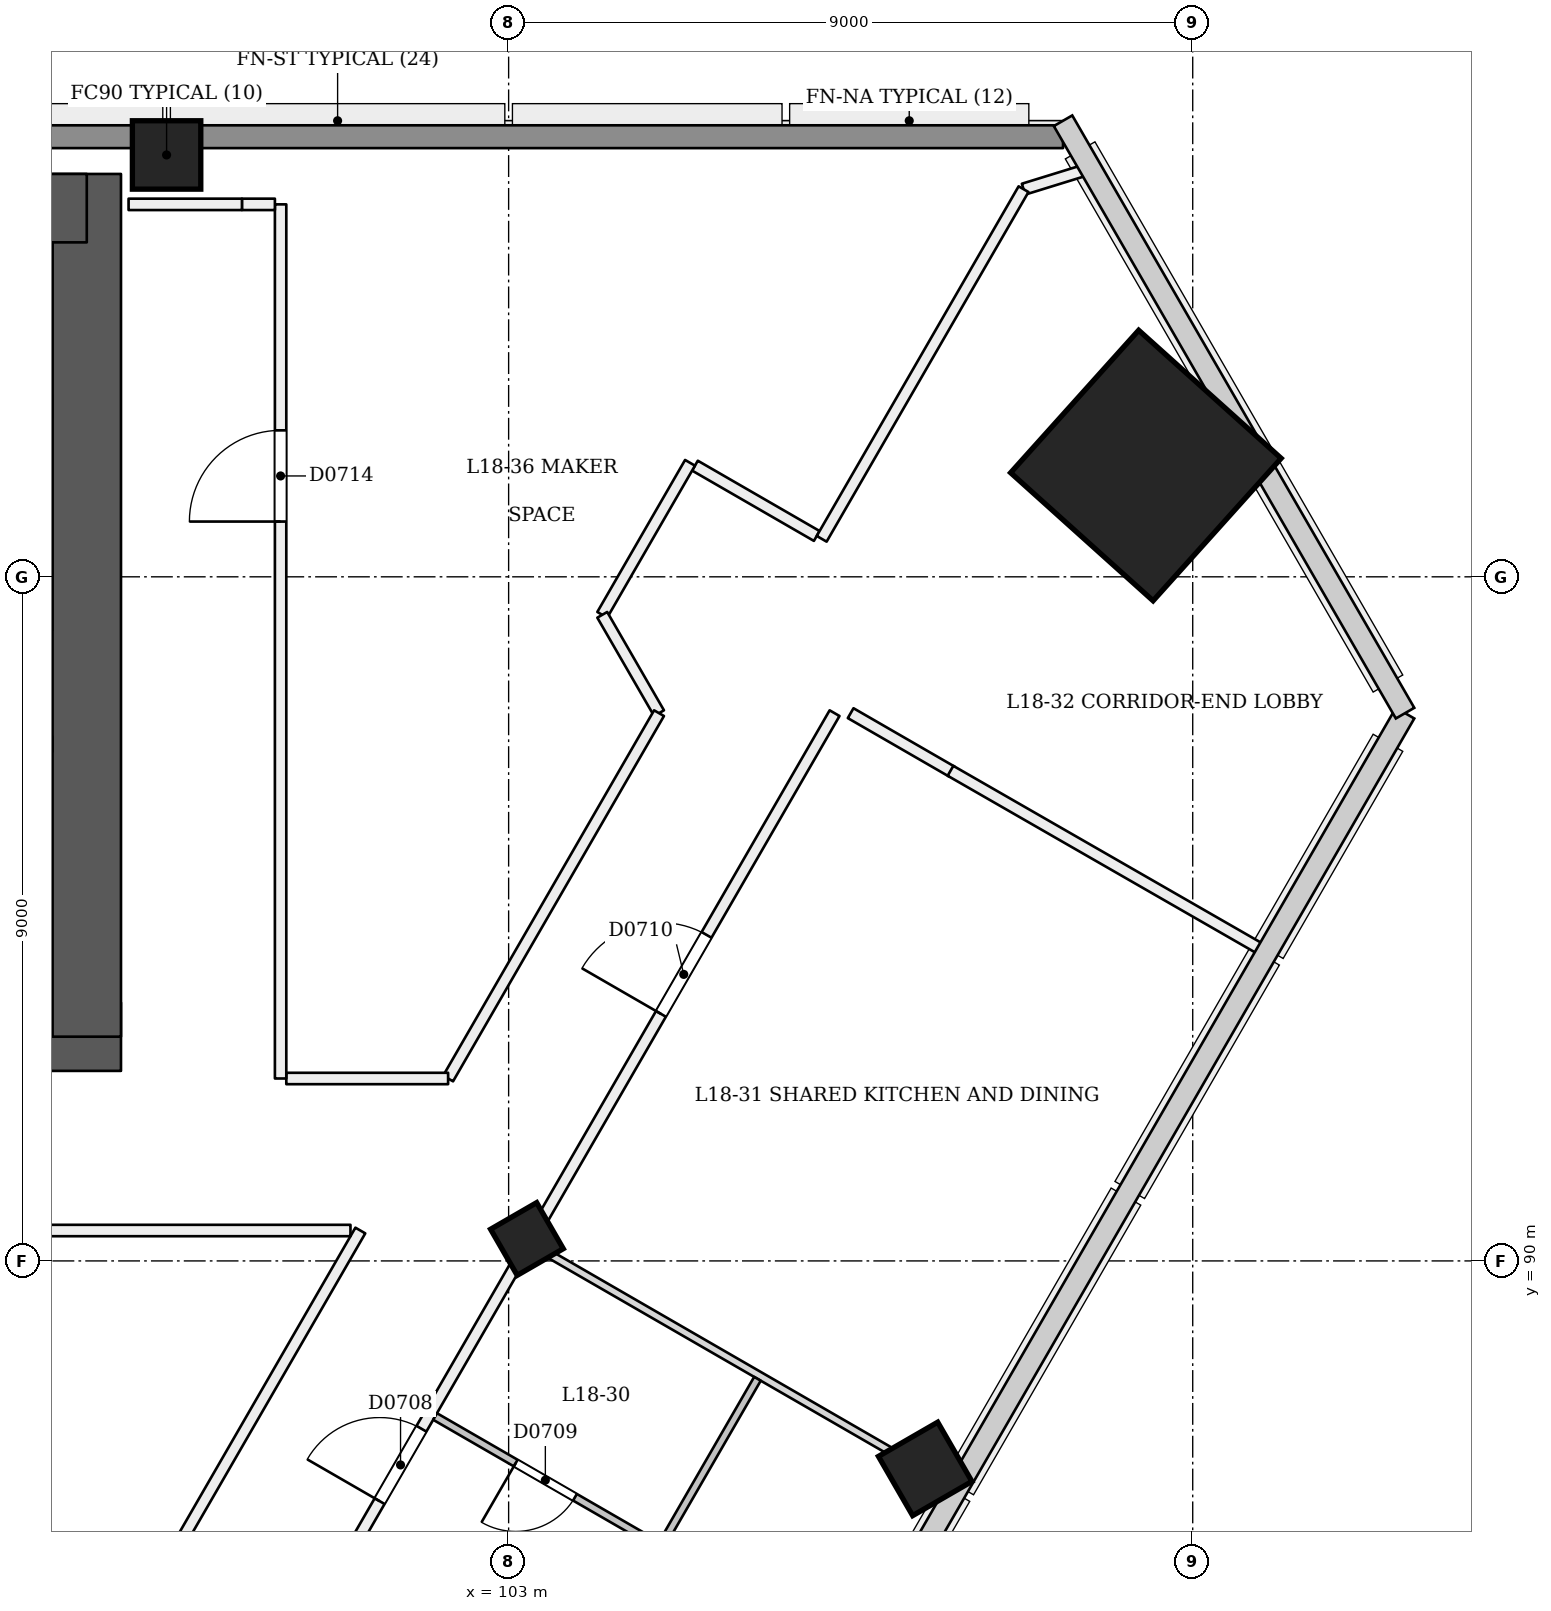
"""IFC4 building model, lengths in metres.
Left out: names, types, materials, properties, quantities, classifications, styles, units other than length and angle.
Written with IfcOpenShell. Run it as: python <this file> out.ifc"""

import sys

from ifc_helpers import new_model, si_unit, direction, frame, frame_2d, origin, origin_2d, place, context, subcontext, project, spatial, rectangle, extrude, element, fill, save


model = new_model("IFC4")
c1 = context("Model", 3, precision=1e-05, world=origin(), true_north=direction((0.0, 1.0)))
c2 = subcontext(c1, "Body", "Model", "MODEL_VIEW")
j1 = project(units=[si_unit("LENGTHUNIT", "METRE"), si_unit("PLANEANGLEUNIT", "RADIAN")], contexts=[c1])
p1 = place(None, origin())
s1 = spatial("IfcSite", under=j1, at=p1, CompositionType="ELEMENT")
p2 = place(p1, origin())
s2 = spatial("IfcBuilding", under=s1, at=p2, CompositionType="ELEMENT")
p3 = place(p2, frame((0.0, 0.0, 73.8)))
s3 = spatial("IfcBuildingStorey", under=s2, at=p3, CompositionType="ELEMENT", Elevation=73.8)
p4 = place(p3, frame((72.55, 92.95, 0.0), z_axis=(0.0, 0.0, 1.0), x_axis=(1.0, 0.0, 0.0)))
e1 = element("IfcWall", 1, at=p4, inside=s3, PredefinedType="SHEAR", context=c2, shape_type="SweptSolid", body=[
    extrude(rectangle(XDim=25.35, YDim=0.9, at=frame_2d((12.675, 0.0))), origin(), (0.0, 0.0, 1.0), 3.6),
])
p5 = place(p4, frame((1.25, 0.0, 0.0)))
e2 = element("IfcOpeningElement", 2, at=p5, cuts=e1, PredefinedType="OPENING", context=c2, shape_type="SweptSolid", body=[
    extrude(rectangle(XDim=1.2, YDim=2.1, at=frame_2d((0.6, 1.05))), frame((0.0, 0.46, 0.0), z_axis=(0.0, -1.0, 0.0), x_axis=(1.0, 0.0, 0.0)), (0.0, 0.0, 1.0), 0.921),
])
p6 = place(p4, frame((3.45, 0.0, 0.0)))
e3 = element("IfcOpeningElement", 3, at=p6, cuts=e1, PredefinedType="OPENING", context=c2, shape_type="SweptSolid", body=[
    extrude(rectangle(XDim=1.2, YDim=2.1, at=frame_2d((0.6, 1.05))), frame((0.0, 0.46, 0.0), z_axis=(0.0, -1.0, 0.0), x_axis=(1.0, 0.0, 0.0)), (0.0, 0.0, 1.0), 0.921),
])
p7 = place(p4, frame((13.45, 0.0, 0.0)))
e4 = element("IfcOpeningElement", 4, at=p7, cuts=e1, PredefinedType="OPENING", context=c2, shape_type="SweptSolid", body=[
    extrude(rectangle(XDim=1.2, YDim=2.1, at=frame_2d((0.6, 1.05))), frame((0.0, 0.46, 0.0), z_axis=(0.0, -1.0, 0.0), x_axis=(1.0, 0.0, 0.0)), (0.0, 0.0, 1.0), 0.921),
])
p8 = place(p4, frame((15.913, 0.0, 0.0)))
e5 = element("IfcOpeningElement", 5, at=p8, cuts=e1, PredefinedType="OPENING", context=c2, shape_type="SweptSolid", body=[
    extrude(rectangle(XDim=1.0, YDim=2.1, at=frame_2d((0.5, 1.05))), frame((0.0, 0.46, 0.0), z_axis=(0.0, -1.0, 0.0), x_axis=(1.0, 0.0, 0.0)), (0.0, 0.0, 1.0), 0.921),
])
p9 = place(p4, frame((18.35, 0.0, 0.0)))
e6 = element("IfcOpeningElement", 6, at=p9, cuts=e1, PredefinedType="OPENING", context=c2, shape_type="SweptSolid", body=[
    extrude(rectangle(XDim=1.0, YDim=2.1, at=frame_2d((0.5, 1.05))), frame((0.0, 0.46, 0.0), z_axis=(0.0, -1.0, 0.0), x_axis=(1.0, 0.0, 0.0)), (0.0, 0.0, 1.0), 0.921),
])
p10 = place(p4, frame((20.7, 0.0, 0.0)))
e7 = element("IfcOpeningElement", 7, at=p10, cuts=e1, PredefinedType="OPENING", context=c2, shape_type="SweptSolid", body=[
    extrude(rectangle(XDim=1.0, YDim=2.1, at=frame_2d((0.5, 1.05))), frame((0.0, 0.46, 0.0), z_axis=(0.0, -1.0, 0.0), x_axis=(1.0, 0.0, 0.0)), (0.0, 0.0, 1.0), 0.921),
])
p11 = place(p4, frame((22.988, 0.0, 0.0)))
e8 = element("IfcOpeningElement", 8, at=p11, cuts=e1, PredefinedType="OPENING", context=c2, shape_type="SweptSolid", body=[
    extrude(rectangle(XDim=1.0, YDim=2.1, at=frame_2d((0.5, 1.05))), frame((0.0, 0.46, 0.0), z_axis=(0.0, -1.0, 0.0), x_axis=(1.0, 0.0, 0.0)), (0.0, 0.0, 1.0), 0.921),
])
p12 = place(p3, frame((97.45, 92.95, 0.0), z_axis=(0.0, 0.0, 1.0), x_axis=(0.0, 1.0, 0.0)))
e9 = element("IfcWall", 9, at=p12, inside=s3, PredefinedType="SHEAR", context=c2, shape_type="SweptSolid", body=[
    extrude(rectangle(XDim=11.35, YDim=0.9, at=frame_2d((5.675, 0.0))), origin(), (0.0, 0.0, 1.0), 3.6),
])
p13 = place(p3, frame((97.45, 103.85, 0.0), z_axis=(0.0, 0.0, 1.0), x_axis=(-1.0, 0.0, 0.0)))
e10 = element("IfcWall", 10, at=p13, inside=s3, PredefinedType="SHEAR", context=c2, shape_type="SweptSolid", body=[
    extrude(rectangle(XDim=25.35, YDim=0.9, at=frame_2d((12.675, 0.0))), origin(), (0.0, 0.0, 1.0), 3.6),
])
p14 = place(p3, frame((103.268, 90.242, -0.021), z_axis=(-0.022222910879, 0.038415824599, 0.999014697916), x_axis=(-0.499512959151, -0.866022170157, 0.022190187852)))
e11 = element("IfcColumn", 11, at=p14, inside=s3, PredefinedType="COLUMN", context=c2, shape_type="SweptSolid", body=[
    extrude(rectangle(XDim=0.7, YDim=0.7, at=origin_2d()), origin(), (0.0, 0.0, 1.0), 3.604),
])
p15 = place(p3, frame((111.418, 100.453, 0.0), z_axis=(-0.028403721265, 0.009287135593, 0.999553389135), x_axis=(0.498883816319, -0.866383823183, 0.022226307414)))
e12 = element("IfcColumn", 12, at=p15, inside=s3, PredefinedType="COLUMN", context=c2, shape_type="SweptSolid", body=[
    extrude(rectangle(XDim=2.52, YDim=2.52, at=origin_2d()), origin(), (0.0, 0.0, 1.0), 3.602),
])
p16 = place(p3, frame((98.5, 104.55, 0.0), z_axis=(0.0, 0.0, 1.0), x_axis=(1.0, 0.0, 0.0)))
e13 = element("IfcColumn", 13, at=p16, inside=s3, PredefinedType="COLUMN", context=c2, shape_type="SweptSolid", body=[
    extrude(rectangle(XDim=0.9, YDim=0.9, at=origin_2d()), origin(), (0.0, 0.0, 1.0), 3.6),
])
p17 = place(p3, frame((108.508, 87.216, -0.027), z_axis=(-0.02222134892, 0.038480872521, 0.999012229206), x_axis=(-0.500174577835, -0.86563950587, 0.022217955907)))
e14 = element("IfcColumn", 14, at=p17, inside=s3, PredefinedType="COLUMN", context=c2, shape_type="SweptSolid", body=[
    extrude(rectangle(XDim=0.9, YDim=0.9, at=origin_2d()), origin(), (0.0, 0.0, 1.0), 3.604),
])
p18 = place(p3, frame((85.747, 59.896, 0.0), z_axis=(0.0, 0.0, 1.0), x_axis=(0.500002549277, 0.866023931954, 0.0)))
e15 = element("IfcWall", 15, at=p18, inside=s3, PredefinedType="PARTITIONING", context=c2, shape_type="SweptSolid", body=[
    extrude(rectangle(XDim=43.082, YDim=0.15, at=frame_2d((21.541, 0.0))), origin(), (0.0, 0.0, 1.0), 2.7),
])
p19 = place(p18, frame((0.244, 0.0, 0.0)))
e16 = element("IfcOpeningElement", 16, at=p19, cuts=e15, PredefinedType="OPENING", context=c2, shape_type="SweptSolid", body=[
    extrude(rectangle(XDim=1.2, YDim=2.1, at=frame_2d((0.6, 1.05))), frame((0.0, 0.085, 0.0), z_axis=(0.0, -1.0, 0.0), x_axis=(1.0, 0.0, 0.0)), (0.0, 0.0, 1.0), 0.171),
])
p20 = place(p18, frame((4.146, 0.0, 0.0)))
e17 = element("IfcOpeningElement", 17, at=p20, cuts=e15, PredefinedType="OPENING", context=c2, shape_type="SweptSolid", body=[
    extrude(rectangle(XDim=1.0, YDim=2.1, at=frame_2d((0.5, 1.05))), frame((0.0, 0.085, 0.0), z_axis=(0.0, -1.0, 0.0), x_axis=(1.0, 0.0, 0.0)), (0.0, 0.0, 1.0), 0.171),
])
p21 = place(p18, frame((10.821, 0.0, 0.0)))
e18 = element("IfcOpeningElement", 18, at=p21, cuts=e15, PredefinedType="OPENING", context=c2, shape_type="SweptSolid", body=[
    extrude(rectangle(XDim=1.0, YDim=2.1, at=frame_2d((0.5, 1.05))), frame((0.0, 0.085, 0.0), z_axis=(0.0, -1.0, 0.0), x_axis=(1.0, 0.0, 0.0)), (0.0, 0.0, 1.0), 0.171),
])
p22 = place(p18, frame((13.262, 0.0, 0.0)))
e19 = element("IfcOpeningElement", 19, at=p22, cuts=e15, PredefinedType="OPENING", context=c2, shape_type="SweptSolid", body=[
    extrude(rectangle(XDim=1.0, YDim=2.1, at=frame_2d((0.5, 1.05))), frame((0.0, 0.085, 0.0), z_axis=(0.0, -1.0, 0.0), x_axis=(1.0, 0.0, 0.0)), (0.0, 0.0, 1.0), 0.171),
])
p23 = place(p18, frame((20.941, 0.0, 0.0)))
e20 = element("IfcOpeningElement", 20, at=p23, cuts=e15, PredefinedType="OPENING", context=c2, shape_type="SweptSolid", body=[
    extrude(rectangle(XDim=1.2, YDim=2.1, at=frame_2d((0.6, 1.05))), frame((0.0, 0.085, 0.0), z_axis=(0.0, -1.0, 0.0), x_axis=(1.0, 0.0, 0.0)), (0.0, 0.0, 1.0), 0.171),
])
p24 = place(p18, frame((28.821, 0.0, 0.0)))
e21 = element("IfcOpeningElement", 21, at=p24, cuts=e15, PredefinedType="OPENING", context=c2, shape_type="SweptSolid", body=[
    extrude(rectangle(XDim=1.0, YDim=2.1, at=frame_2d((0.5, 1.05))), frame((0.0, 0.085, 0.0), z_axis=(0.0, -1.0, 0.0), x_axis=(1.0, 0.0, 0.0)), (0.0, 0.0, 1.0), 0.171),
])
p25 = place(p18, frame((31.112, 0.0, 0.0)))
e22 = element("IfcOpeningElement", 22, at=p25, cuts=e15, PredefinedType="OPENING", context=c2, shape_type="SweptSolid", body=[
    extrude(rectangle(XDim=1.1, YDim=2.1, at=frame_2d((0.55, 1.05))), frame((0.0, 0.085, 0.0), z_axis=(0.0, -1.0, 0.0), x_axis=(1.0, 0.0, 0.0)), (0.0, 0.0, 1.0), 0.171),
])
p26 = place(p18, frame((38.514, 0.0, 0.0)))
e23 = element("IfcOpeningElement", 23, at=p26, cuts=e15, PredefinedType="OPENING", context=c2, shape_type="SweptSolid", body=[
    extrude(rectangle(XDim=1.2, YDim=2.1, at=frame_2d((0.6, 1.05))), frame((0.0, 0.085, 0.0), z_axis=(0.0, -1.0, 0.0), x_axis=(1.0, 0.0, 0.0)), (0.0, 0.0, 1.0), 0.171),
])
p27 = place(p3, frame((107.5, 97.206, 0.0), z_axis=(0.0, 0.0, 1.0), x_axis=(0.866034781647, -0.499983756713, 0.0)))
e24 = element("IfcWall", 24, at=p27, inside=s3, PredefinedType="PARTITIONING", context=c2, shape_type="SweptSolid", body=[
    extrude(rectangle(XDim=1.537, YDim=0.15, at=frame_2d((0.768, 0.0))), origin(), (0.0, 0.0, 1.0), 3.1),
])
p28 = place(p3, frame((101.049, 90.4, 0.0), z_axis=(0.0, 0.0, 1.0), x_axis=(-0.500000325473, -0.866025215872, 0.0)))
e25 = element("IfcWall", 25, at=p28, inside=s3, PredefinedType="PARTITIONING", context=c2, shape_type="SweptSolid", body=[
    extrude(rectangle(XDim=31.968, YDim=0.15, at=frame_2d((15.984, 0.0))), origin(), (0.0, 0.0, 1.0), 3.1),
])
p29 = place(p28, frame((16.691, 0.0, 0.0)))
e26 = element("IfcOpeningElement", 26, at=p29, cuts=e25, PredefinedType="OPENING", context=c2, shape_type="SweptSolid", body=[
    extrude(rectangle(XDim=1.2, YDim=2.1, at=frame_2d((0.6, 1.05))), frame((0.0, 0.085, 0.0), z_axis=(0.0, -1.0, 0.0), x_axis=(1.0, 0.0, 0.0)), (0.0, 0.0, 1.0), 0.171),
])
p30 = place(p28, frame((6.541, 0.0, 0.0)))
e27 = element("IfcOpeningElement", 27, at=p30, cuts=e25, PredefinedType="OPENING", context=c2, shape_type="SweptSolid", body=[
    extrude(rectangle(XDim=1.2, YDim=2.1, at=frame_2d((0.6, 1.05))), frame((0.0, 0.085, 0.0), z_axis=(0.0, -1.0, 0.0), x_axis=(1.0, 0.0, 0.0)), (0.0, 0.0, 1.0), 0.171),
])
p31 = place(p3, frame((88.0, 90.4, 0.0), z_axis=(0.0, 0.0, 1.0), x_axis=(1.0, 0.0, 0.0)))
e28 = element("IfcWall", 28, at=p31, inside=s3, PredefinedType="PARTITIONING", context=c2, shape_type="SweptSolid", body=[
    extrude(rectangle(XDim=12.919, YDim=0.15, at=frame_2d((6.459, 0.0))), origin(), (0.0, 0.0, 1.0), 3.1),
])
p32 = place(p3, frame((107.053, 99.538, 0.0), z_axis=(0.0, 0.0, 1.0), x_axis=(-0.866058118026, 0.49994333299, 0.0)))
e29 = element("IfcWall", 29, at=p32, inside=s3, PredefinedType="PARTITIONING", context=c2, shape_type="SweptSolid", body=[
    extrude(rectangle(XDim=1.85, YDim=0.15, at=frame_2d((0.925, 0.0))), origin(), (0.0, 0.0, 1.0), 3.1),
])
p33 = place(p3, frame((105.386, 100.5, 0.0), z_axis=(0.0, 0.0, 1.0), x_axis=(-0.500027479704, -0.866009537788, 0.0)))
e30 = element("IfcWall", 30, at=p33, inside=s3, PredefinedType="PARTITIONING", context=c2, shape_type="SweptSolid", body=[
    extrude(rectangle(XDim=2.309, YDim=0.15, at=frame_2d((1.155, 0.0))), origin(), (0.0, 0.0, 1.0), 3.1),
])
p34 = place(p3, frame((104.232, 98.5, 0.0), z_axis=(0.0, 0.0, 1.0), x_axis=(0.500076103225, -0.865981461108, 0.0)))
e31 = element("IfcWall", 31, at=p34, inside=s3, PredefinedType="PARTITIONING", context=c2, shape_type="SweptSolid", body=[
    extrude(rectangle(XDim=1.494, YDim=0.15, at=frame_2d((0.747, 0.0))), origin(), (0.0, 0.0, 1.0), 3.1),
])
p35 = place(p3, frame((104.979, 97.206, 0.0), z_axis=(0.0, 0.0, 1.0), x_axis=(-0.499990275446, -0.866031018186, 0.0)))
e32 = element("IfcWall", 32, at=p35, inside=s3, PredefinedType="PARTITIONING", context=c2, shape_type="SweptSolid", body=[
    extrude(rectangle(XDim=5.55, YDim=0.15, at=frame_2d((2.775, 0.0))), origin(), (0.0, 0.0, 1.0), 3.1),
])
p36 = place(p3, frame((102.204, 92.4, 0.0), z_axis=(0.0, 0.0, 1.0), x_axis=(-1.0, 0.0, 0.0)))
e33 = element("IfcWall", 33, at=p36, inside=s3, PredefinedType="PARTITIONING", context=c2, shape_type="SweptSolid", body=[
    extrude(rectangle(XDim=2.129, YDim=0.15, at=frame_2d((1.064, 0.0))), origin(), (0.0, 0.0, 1.0), 3.1),
])
p37 = place(p3, frame((100.0, 92.4, 0.0), z_axis=(0.0, 0.0, 1.0), x_axis=(0.0, 1.0, 0.0)))
e34 = element("IfcWall", 34, at=p37, inside=s3, PredefinedType="PARTITIONING", context=c2, shape_type="SweptSolid", body=[
    extrude(rectangle(XDim=11.5, YDim=0.15, at=frame_2d((5.75, 0.0))), origin(), (0.0, 0.0, 1.0), 2.6),
])
p38 = place(p37, frame((7.327, 0.0, 0.0)))
e35 = element("IfcOpeningElement", 35, at=p38, cuts=e34, PredefinedType="OPENING", context=c2, shape_type="SweptSolid", body=[
    extrude(rectangle(XDim=1.2, YDim=2.1, at=frame_2d((0.6, 1.05))), frame((0.0, 0.085, 0.0), z_axis=(0.0, -1.0, 0.0), x_axis=(1.0, 0.0, 0.0)), (0.0, 0.0, 1.0), 0.171),
])
p39 = place(p3, frame((99.925, 103.9, 0.0), z_axis=(0.0, 0.0, 1.0), x_axis=(-1.0, 0.0, 0.0)))
e36 = element("IfcWall", 36, at=p39, inside=s3, PredefinedType="PARTITIONING", context=c2, shape_type="SweptSolid", body=[
    extrude(rectangle(XDim=0.434, YDim=0.15, at=frame_2d((0.217, 0.0))), origin(), (0.0, 0.0, 1.0), 2.6),
])
p40 = place(p3, frame((99.491, 103.9, 0.0), z_axis=(0.0, 0.0, 1.0), x_axis=(-1.0, 0.0, 0.0)))
e37 = element("IfcWall", 37, at=p40, inside=s3, PredefinedType="PARTITIONING", context=c2, shape_type="SweptSolid", body=[
    extrude(rectangle(XDim=1.491, YDim=0.15, at=frame_2d((0.746, 0.0))), origin(), (0.0, 0.0, 1.0), 3.1),
])
p41 = place(p3, frame((106.274, 88.449, 0.0), z_axis=(0.0, 0.0, 1.0), x_axis=(-0.500020783669, -0.866013403995, 0.0)))
e38 = element("IfcWall", 38, at=p41, inside=s3, PredefinedType="PARTITIONING", context=c2, shape_type="SweptSolid", body=[
    extrude(rectangle(XDim=2.55, YDim=0.1, at=frame_2d((1.275, 0.0))), origin(), (0.0, 0.0, 1.0), 2.7),
])
p42 = place(p3, frame((104.999, 86.241, 0.0), z_axis=(0.0, 0.0, 1.0), x_axis=(-0.866001587311, 0.500041249073, 0.0)))
e39 = element("IfcWall", 39, at=p42, inside=s3, PredefinedType="PARTITIONING", context=c2, shape_type="SweptSolid", body=[
    extrude(rectangle(XDim=3.425, YDim=0.1, at=frame_2d((1.712, 0.0))), origin(), (0.0, 0.0, 1.0), 3.1),
])
p43 = place(p42, frame((1.3, 0.0, 0.0)))
e40 = element("IfcOpeningElement", 40, at=p43, cuts=e39, PredefinedType="OPENING", context=c2, shape_type="SweptSolid", body=[
    extrude(rectangle(XDim=0.9, YDim=2.1, at=frame_2d((0.45, 1.05))), frame((0.0, 0.061, 0.0), z_axis=(0.0, -1.0, 0.0), x_axis=(1.0, 0.0, 0.0)), (0.0, 0.0, 1.0), 0.121),
])
p44 = place(p3, frame((108.81, 87.042, 0.0), z_axis=(0.0, 0.0, 1.0), x_axis=(-0.866032601554, 0.49998753289, 0.0)))
e41 = element("IfcWall", 41, at=p44, inside=s3, PredefinedType="PARTITIONING", context=c2, shape_type="SweptSolid", body=[
    extrude(rectangle(XDim=6.325, YDim=0.1, at=frame_2d((3.163, 0.0))), origin(), (0.0, 0.0, 1.0), 2.6),
])
p45 = place(p3, frame((112.906, 94.096, 0.0), z_axis=(0.0, 0.0, 1.0), x_axis=(-0.86705657789, 0.498209685512, 0.0)))
e42 = element("IfcWall", 42, at=p45, inside=s3, PredefinedType="PARTITIONING", context=c2, shape_type="SweptSolid", body=[
    extrude(rectangle(XDim=4.72, YDim=0.15, at=frame_2d((2.36, 0.0))), origin(), (0.0, 0.0, 1.0), 2.6),
])
p46 = place(p3, frame((110.579, 104.348, 0.0), z_axis=(0.0, 0.0, 1.0), x_axis=(-0.955465075494, -0.295104201108, 0.0)))
e43 = element("IfcWall", 43, at=p46, inside=s3, PredefinedType="PARTITIONING", context=c2, shape_type="SweptSolid", body=[
    extrude(rectangle(XDim=0.842, YDim=0.15, at=frame_2d((0.421, 0.0))), origin(), (0.0, 0.0, 1.0), 3.1),
])
p47 = place(p3, frame((109.774, 104.1, 0.0), z_axis=(0.0, 0.0, 1.0), x_axis=(-0.500004949648, -0.866022546085, 0.0)))
e44 = element("IfcWall", 44, at=p47, inside=s3, PredefinedType="PARTITIONING", context=c2, shape_type="SweptSolid", body=[
    extrude(rectangle(XDim=5.312, YDim=0.15, at=frame_2d((2.656, 0.0))), origin(), (0.0, 0.0, 1.0), 2.6),
])
p48 = place(p3, frame((59.706, 104.79, 0.0), z_axis=(0.0, 0.0, 1.0), x_axis=(1.0, 0.0, 0.0)))
e45 = element("IfcWall", 45, at=p48, inside=s3, PredefinedType="SOLIDWALL", context=c2, shape_type="SweptSolid", body=[
    extrude(rectangle(XDim=50.588, YDim=0.3, at=frame_2d((25.294, 0.0))), origin(), (0.0, 0.0, 1.0), 2.6),
])
p49 = place(p25, origin())
e46 = element("IfcDoor", 46, at=p49, inside=s3, OperationType="SINGLE_SWING_LEFT", PredefinedType="NOTDEFINED", context=c2, shape_type="SweptSolid", body=[
    extrude(rectangle(XDim=1.1, YDim=2.1, at=frame_2d((0.55, 1.05))), frame((0.0, 0.025, 0.0), z_axis=(0.0, -1.0, 0.0), x_axis=(1.0, 0.0, 0.0)), (0.0, 0.0, 1.0), 0.05),
])
fill(e22, e46)
p50 = place(p43, origin())
e47 = element("IfcDoor", 47, at=p50, inside=s3, OperationType="SINGLE_SWING_RIGHT", PredefinedType="NOTDEFINED", context=c2, shape_type="SweptSolid", body=[
    extrude(rectangle(XDim=0.9, YDim=2.1, at=frame_2d((0.45, 1.05))), frame((0.0, 0.025, 0.0), z_axis=(0.0, -1.0, 0.0), x_axis=(1.0, 0.0, 0.0)), (0.0, 0.0, 1.0), 0.05),
])
fill(e40, e47)
p51 = place(p26, origin())
e48 = element("IfcDoor", 48, at=p51, inside=s3, OperationType="SINGLE_SWING_LEFT", PredefinedType="NOTDEFINED", context=c2, shape_type="SweptSolid", body=[
    extrude(rectangle(XDim=1.2, YDim=2.1, at=frame_2d((0.6, 1.05))), frame((0.0, 0.025, 0.0), z_axis=(0.0, -1.0, 0.0), x_axis=(1.0, 0.0, 0.0)), (0.0, 0.0, 1.0), 0.05),
])
fill(e23, e48)
p52 = place(p38, origin())
e49 = element("IfcDoor", 49, at=p52, inside=s3, OperationType="SINGLE_SWING_LEFT", PredefinedType="NOTDEFINED", context=c2, shape_type="SweptSolid", body=[
    extrude(rectangle(XDim=1.2, YDim=2.1, at=frame_2d((0.6, 1.05))), frame((0.0, 0.025, 0.0), z_axis=(0.0, -1.0, 0.0), x_axis=(1.0, 0.0, 0.0)), (0.0, 0.0, 1.0), 0.05),
])
fill(e35, e49)
save(model, sys.argv[1])
